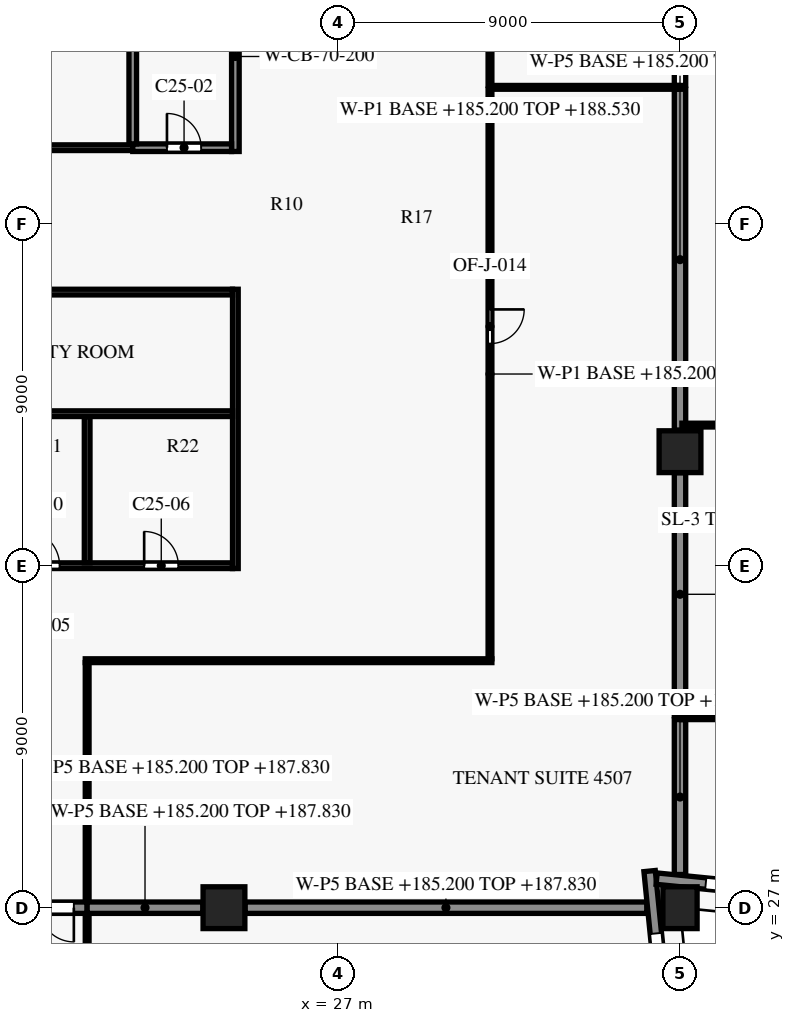
"""IFC4 building model, lengths in metres.
Left out: names, types, materials, properties, quantities, classifications, styles, units other than length and angle.
Written with IfcOpenShell. Run it as: python <this file> out.ifc"""

import sys

from ifc_helpers import new_model, si_unit, direction, frame, frame_2d, origin, origin_2d, place, context, subcontext, project, spatial, rectangle, extrude, element, fill, save


model = new_model("IFC4")
c1 = context("Model", 3, precision=1e-05, world=origin(), true_north=direction((0.0, 1.0)))
c2 = subcontext(c1, "Body", "Model", "MODEL_VIEW")
j1 = project(units=[si_unit("LENGTHUNIT", "METRE"), si_unit("PLANEANGLEUNIT", "RADIAN")], contexts=[c1])
p1 = place(None, origin())
s1 = spatial("IfcSite", under=j1, at=p1, CompositionType="ELEMENT")
p2 = place(p1, origin())
s2 = spatial("IfcBuilding", under=s1, at=p2, CompositionType="ELEMENT")
p3 = place(p2, frame((0.0, 0.0, 185.2)))
s3 = spatial("IfcBuildingStorey", under=s2, at=p3, CompositionType="ELEMENT", Elevation=185.2)
p4 = place(p3, frame((36.0, 27.0, 0.0), z_axis=(0.0, 0.0, 1.0), x_axis=(-0.0995038382, 0.995037178292, 0.0)))
e1 = element("IfcColumn", 1, at=p4, inside=s3, PredefinedType="COLUMN", context=c2, shape_type="SweptSolid", body=[
    extrude(rectangle(XDim=0.9, YDim=1.1, at=origin_2d()), origin(), (0.0, 0.0, 1.0), 3.8),
])
for number, where, z_axis, x_axis in (
    (2, (24.0, 27.0, 0.0), (0.0, 0.0, 1.0), (1.0, 0.0, 0.0)),
    (3, (36.0, 39.0, 0.0), (0.0, 0.0, 1.0), (1.0, 0.0, 0.0)),
):
    element("IfcColumn", number, at=place(p3, frame(where, z_axis=z_axis, x_axis=x_axis)), inside=s3, PredefinedType="COLUMN", context=c2, shape_type="SweptSolid", body=[
        extrude(rectangle(XDim=1.1, YDim=1.1, at=origin_2d()), origin(), (0.0, 0.0, 1.0), 3.8),
    ])
p5 = place(p3, frame((35.2, 27.964, 0.0), z_axis=(0.0, 0.0, 1.0), x_axis=(0.099501297882, -0.995037432321, 0.0)))
e4 = element("IfcWall", 4, at=p5, inside=s3, PredefinedType="SOLIDWALL", context=c2, shape_type="SweptSolid", body=[
    extrude(rectangle(XDim=9.984, YDim=0.3, at=frame_2d((4.992, 0.0))), origin(), (0.0, 0.0, 1.0), 3.15),
])
p6 = place(p5, frame((1.65, 0.0, 0.15)))
e5 = element("IfcOpeningElement", 5, at=p6, cuts=e4, PredefinedType="OPENING", context=c2, shape_type="SweptSolid", body=[
    extrude(rectangle(XDim=3.3, YDim=2.4, at=frame_2d((1.65, 1.2))), frame((0.0, 0.16, 0.0), z_axis=(0.0, -1.0, 0.0), x_axis=(1.0, 0.0, 0.0)), (0.0, 0.0, 1.0), 0.32),
])
p7 = place(p5, frame((6.923, 0.0, 0.75)))
e6 = element("IfcOpeningElement", 6, at=p7, cuts=e4, PredefinedType="OPENING", context=c2, shape_type="SweptSolid", body=[
    extrude(rectangle(XDim=1.8, YDim=1.8, at=frame_2d((0.9, 0.9))), frame((0.0, 0.16, 0.0), z_axis=(0.0, -1.0, 0.0), x_axis=(1.0, 0.0, 0.0)), (0.0, 0.0, 1.0), 0.32),
])
p8 = place(p3, frame((45.015, 26.802, 0.0), z_axis=(0.0, 0.0, 1.0), x_axis=(-0.995037689759, 0.099498723402, 0.0)))
e7 = element("IfcWall", 7, at=p8, inside=s3, PredefinedType="SOLIDWALL", context=c2, shape_type="SweptSolid", body=[
    extrude(rectangle(XDim=9.677, YDim=0.3, at=frame_2d((4.839, 0.0))), origin(), (0.0, 0.0, 1.0), 3.15),
])
p9 = place(p8, frame((1.306, 0.0, 0.75)))
e8 = element("IfcOpeningElement", 8, at=p9, cuts=e7, PredefinedType="OPENING", context=c2, shape_type="SweptSolid", body=[
    extrude(rectangle(XDim=1.8, YDim=1.8, at=frame_2d((0.9, 0.9))), frame((0.0, 0.16, 0.0), z_axis=(0.0, -1.0, 0.0), x_axis=(1.0, 0.0, 0.0)), (0.0, 0.0, 1.0), 0.32),
])
p10 = place(p8, frame((5.079, 0.0, 0.15)))
e9 = element("IfcOpeningElement", 9, at=p10, cuts=e7, PredefinedType="OPENING", context=c2, shape_type="SweptSolid", body=[
    extrude(rectangle(XDim=3.3, YDim=2.4, at=frame_2d((1.65, 1.2))), frame((0.0, 0.16, 0.0), z_axis=(0.0, -1.0, 0.0), x_axis=(1.0, 0.0, 0.0)), (0.0, 0.0, 1.0), 0.32),
])
p11 = place(p3, frame((12.4, 36.0, 0.0), z_axis=(0.0, 0.0, 1.0), x_axis=(1.0, 0.0, 0.0)))
e10 = element("IfcWall", 10, at=p11, inside=s3, PredefinedType="SHEAR", context=c2, shape_type="SweptSolid", body=[
    extrude(rectangle(XDim=11.825, YDim=0.15, at=frame_2d((5.913, 0.0))), origin(), (0.0, 0.0, 1.0), 3.5),
])
p12 = place(p11, frame((0.95, 0.0, 0.0)))
e11 = element("IfcOpeningElement", 11, at=p12, cuts=e10, PredefinedType="OPENING", context=c2, shape_type="SweptSolid", body=[
    extrude(rectangle(XDim=0.9, YDim=2.1, at=frame_2d((0.45, 1.05))), frame((0.0, 0.085, 0.0), z_axis=(0.0, -1.0, 0.0), x_axis=(1.0, 0.0, 0.0)), (0.0, 0.0, 1.0), 0.17),
])
p13 = place(p11, frame((3.75, 0.0, 0.0)))
e12 = element("IfcOpeningElement", 12, at=p13, cuts=e10, PredefinedType="OPENING", context=c2, shape_type="SweptSolid", body=[
    extrude(rectangle(XDim=0.9, YDim=2.1, at=frame_2d((0.45, 1.05))), frame((0.0, 0.085, 0.0), z_axis=(0.0, -1.0, 0.0), x_axis=(1.0, 0.0, 0.0)), (0.0, 0.0, 1.0), 0.17),
])
p14 = place(p11, frame((6.325, 0.0, 0.0)))
e13 = element("IfcOpeningElement", 13, at=p14, cuts=e10, PredefinedType="OPENING", context=c2, shape_type="SweptSolid", body=[
    extrude(rectangle(XDim=0.95, YDim=2.1, at=frame_2d((0.475, 1.05))), frame((0.0, 0.085, 0.0), z_axis=(0.0, -1.0, 0.0), x_axis=(1.0, 0.0, 0.0)), (0.0, 0.0, 1.0), 0.17),
])
p15 = place(p11, frame((9.5, 0.0, 0.0)))
e14 = element("IfcOpeningElement", 14, at=p15, cuts=e10, PredefinedType="OPENING", context=c2, shape_type="SweptSolid", body=[
    extrude(rectangle(XDim=0.9, YDim=2.1, at=frame_2d((0.45, 1.05))), frame((0.0, 0.085, 0.0), z_axis=(0.0, -1.0, 0.0), x_axis=(1.0, 0.0, 0.0)), (0.0, 0.0, 1.0), 0.17),
])
p16 = place(p3, frame((8.1, 40.0, 0.0), z_axis=(0.0, 0.0, 1.0), x_axis=(1.0, 0.0, 0.0)))
e15 = element("IfcWall", 15, at=p16, inside=s3, PredefinedType="PARTITIONING", context=c2, shape_type="SweptSolid", body=[
    extrude(rectangle(XDim=16.125, YDim=0.15, at=frame_2d((8.062, 0.0))), origin(), (0.0, 0.0, 1.0), 3.5),
])
p17 = place(p3, frame((8.1, 43.2, 0.0), z_axis=(0.0, 0.0, 1.0), x_axis=(1.0, 0.0, 0.0)))
e16 = element("IfcWall", 16, at=p17, inside=s3, PredefinedType="PARTITIONING", context=c2, shape_type="SweptSolid", body=[
    extrude(rectangle(XDim=16.125, YDim=0.15, at=frame_2d((8.062, 0.0))), origin(), (0.0, 0.0, 1.0), 3.5),
])
p18 = place(p17, frame((1.925, 0.0, 0.0)))
e17 = element("IfcOpeningElement", 17, at=p18, cuts=e16, PredefinedType="OPENING", context=c2, shape_type="SweptSolid", body=[
    extrude(rectangle(XDim=0.9, YDim=2.1, at=frame_2d((0.45, 1.05))), frame((0.0, 0.085, 0.0), z_axis=(0.0, -1.0, 0.0), x_axis=(1.0, 0.0, 0.0)), (0.0, 0.0, 1.0), 0.17),
])
p19 = place(p17, frame((10.025, 0.0, 0.0)))
e18 = element("IfcOpeningElement", 18, at=p19, cuts=e16, PredefinedType="OPENING", context=c2, shape_type="SweptSolid", body=[
    extrude(rectangle(XDim=0.9, YDim=2.1, at=frame_2d((0.45, 1.05))), frame((0.0, 0.085, 0.0), z_axis=(0.0, -1.0, 0.0), x_axis=(1.0, 0.0, 0.0)), (0.0, 0.0, 1.0), 0.17),
])
p20 = place(p3, frame((8.1, 47.0, 0.0), z_axis=(0.0, 0.0, 1.0), x_axis=(1.0, 0.0, 0.0)))
e19 = element("IfcWall", 19, at=p20, inside=s3, PredefinedType="PARTITIONING", context=c2, shape_type="SweptSolid", body=[
    extrude(rectangle(XDim=13.5, YDim=0.15, at=frame_2d((6.75, 0.0))), origin(), (0.0, 0.0, 1.0), 3.5),
])
p21 = place(p20, frame((1.525, 0.0, 0.0)))
e20 = element("IfcOpeningElement", 20, at=p21, cuts=e19, PredefinedType="OPENING", context=c2, shape_type="SweptSolid", body=[
    extrude(rectangle(XDim=0.9, YDim=2.1, at=frame_2d((0.45, 1.05))), frame((0.0, 0.085, 0.0), z_axis=(0.0, -1.0, 0.0), x_axis=(1.0, 0.0, 0.0)), (0.0, 0.0, 1.0), 0.17),
])
p22 = place(p20, frame((8.275, 0.0, 0.0)))
e21 = element("IfcOpeningElement", 21, at=p22, cuts=e19, PredefinedType="OPENING", context=c2, shape_type="SweptSolid", body=[
    extrude(rectangle(XDim=0.9, YDim=2.1, at=frame_2d((0.45, 1.05))), frame((0.0, 0.085, 0.0), z_axis=(0.0, -1.0, 0.0), x_axis=(1.0, 0.0, 0.0)), (0.0, 0.0, 1.0), 0.17),
])
p23 = place(p3, frame((21.6, 47.0, 0.0), z_axis=(0.0, 0.0, 1.0), x_axis=(1.0, 0.0, 0.0)))
e22 = element("IfcWall", 22, at=p23, inside=s3, PredefinedType="PARTITIONING", context=c2, shape_type="SweptSolid", body=[
    extrude(rectangle(XDim=2.6, YDim=0.2, at=frame_2d((1.3, 0.0))), origin(), (0.0, 0.0, 1.0), 3.5),
])
p24 = place(p23, frame((0.9, 0.0, 0.0)))
e23 = element("IfcOpeningElement", 23, at=p24, cuts=e22, PredefinedType="OPENING", context=c2, shape_type="SweptSolid", body=[
    extrude(rectangle(XDim=0.9, YDim=2.1, at=frame_2d((0.45, 1.05))), frame((0.0, 0.11, 0.0), z_axis=(0.0, -1.0, 0.0), x_axis=(1.0, 0.0, 0.0)), (0.0, 0.0, 1.0), 0.22),
])
p25 = place(p3, frame((20.4, 36.075, 0.0), z_axis=(0.0, 0.0, 1.0), x_axis=(0.0, 1.0, 0.0)))
e24 = element("IfcWall", 24, at=p25, inside=s3, PredefinedType="PARTITIONING", context=c2, shape_type="SweptSolid", body=[
    extrude(rectangle(XDim=3.85, YDim=0.15, at=frame_2d((1.925, 0.0))), origin(), (0.0, 0.0, 1.0), 3.5),
])
p26 = place(p3, frame((21.6, 47.1, 0.0), z_axis=(0.0, 0.0, 1.0), x_axis=(0.0, 1.0, 0.0)))
e25 = element("IfcWall", 25, at=p26, inside=s3, PredefinedType="PARTITIONING", context=c2, shape_type="SweptSolid", body=[
    extrude(rectangle(XDim=4.6, YDim=0.2, at=frame_2d((2.3, 0.0))), origin(), (0.0, 0.0, 1.0), 3.5),
])
p27 = place(p3, frame((24.3, 35.925, 0.0), z_axis=(0.0, 0.0, 1.0), x_axis=(0.0, 1.0, 0.0)))
e26 = element("IfcWall", 26, at=p27, inside=s3, PredefinedType="PARTITIONING", context=c2, shape_type="SweptSolid", body=[
    extrude(rectangle(XDim=7.35, YDim=0.15, at=frame_2d((3.675, 0.0))), origin(), (0.0, 0.0, 1.0), 3.5),
])
p28 = place(p3, frame((24.3, 46.9, 0.0), z_axis=(0.0, 0.0, 1.0), x_axis=(0.0, 1.0, 0.0)))
e27 = element("IfcWall", 27, at=p28, inside=s3, PredefinedType="SHEAR", context=c2, shape_type="SweptSolid", body=[
    extrude(rectangle(XDim=5.0, YDim=0.2, at=frame_2d((2.5, 0.0))), origin(), (0.0, 0.0, 1.0), 3.5),
])
p29 = place(p3, frame((20.4, 26.83, 0.0), z_axis=(0.0, 0.0, 1.0), x_axis=(0.0, -1.0, 0.0)))
e28 = element("IfcWall", 28, at=p29, inside=s3, PredefinedType="PARTITIONING", context=c2, shape_type="SweptSolid", body=[
    extrude(rectangle(XDim=14.48, YDim=0.1, at=frame_2d((7.24, 0.0))), origin(), (0.0, 0.0, 1.0), 2.63),
])
p30 = place(p29, frame((6.73, 0.0, 0.0)))
e29 = element("IfcOpeningElement", 29, at=p30, cuts=e28, PredefinedType="OPENING", context=c2, shape_type="SweptSolid", body=[
    extrude(rectangle(XDim=0.9, YDim=2.1, at=frame_2d((0.45, 1.05))), frame((0.0, 0.06, 0.0), z_axis=(0.0, -1.0, 0.0), x_axis=(1.0, 0.0, 0.0)), (0.0, 0.0, 1.0), 0.12),
])
p31 = place(p3, frame((20.4, 27.0, 0.0), z_axis=(0.0, 0.0, 1.0), x_axis=(-1.0, 0.0, 0.0)))
e30 = element("IfcWall", 30, at=p31, inside=s3, PredefinedType="PARTITIONING", context=c2, shape_type="SweptSolid", body=[
    extrude(rectangle(XDim=2.5, YDim=0.3, at=frame_2d((1.25, 0.0))), origin(), (0.0, 0.0, 1.0), 2.63),
])
p32 = place(p31, frame((0.35, 0.0, 0.0)))
e31 = element("IfcOpeningElement", 31, at=p32, cuts=e30, PredefinedType="OPENING", context=c2, shape_type="SweptSolid", body=[
    extrude(rectangle(XDim=1.8, YDim=2.1, at=frame_2d((0.9, 1.05))), frame((0.0, 0.16, 0.0), z_axis=(0.0, -1.0, 0.0), x_axis=(1.0, 0.0, 0.0)), (0.0, 0.0, 1.0), 0.32),
])
p33 = place(p3, frame((20.4, 27.0, 0.0), z_axis=(0.0, 0.0, 1.0), x_axis=(1.0, 0.0, 0.0)))
e32 = element("IfcWall", 32, at=p33, inside=s3, PredefinedType="PARTITIONING", context=c2, shape_type="SweptSolid", body=[
    extrude(rectangle(XDim=3.045, YDim=0.3, at=frame_2d((1.522, 0.0))), origin(), (0.0, 0.0, 1.0), 2.63),
])
p34 = place(p3, frame((24.555, 27.0, 0.0), z_axis=(0.0, 0.0, 1.0), x_axis=(1.0, 0.0, 0.0)))
e33 = element("IfcWall", 33, at=p34, inside=s3, PredefinedType="PARTITIONING", context=c2, shape_type="SweptSolid", body=[
    extrude(rectangle(XDim=10.571, YDim=0.3, at=frame_2d((5.285, 0.0))), origin(), (0.0, 0.0, 1.0), 2.63),
])
p35 = place(p3, frame((36.0, 27.874, 0.0), z_axis=(0.0, 0.0, 1.0), x_axis=(0.0, 1.0, 0.0)))
e34 = element("IfcWall", 34, at=p35, inside=s3, PredefinedType="PARTITIONING", context=c2, shape_type="SweptSolid", body=[
    extrude(rectangle(XDim=4.076, YDim=0.3, at=frame_2d((2.038, 0.0))), origin(), (0.0, 0.0, 1.0), 2.63),
])
p36 = place(p3, frame((44.95, 32.0, 0.0), z_axis=(0.0, 0.0, 1.0), x_axis=(-1.0, 0.0, 0.0)))
e35 = element("IfcWall", 35, at=p36, inside=s3, PredefinedType="PARTITIONING", context=c2, shape_type="SweptSolid", body=[
    extrude(rectangle(XDim=8.9, YDim=0.1, at=frame_2d((4.45, 0.0))), origin(), (0.0, 0.0, 1.0), 2.63),
])
p37 = place(p36, frame((4.0, 0.0, 0.0)))
e36 = element("IfcOpeningElement", 36, at=p37, cuts=e35, PredefinedType="OPENING", context=c2, shape_type="SweptSolid", body=[
    extrude(rectangle(XDim=0.9, YDim=2.1, at=frame_2d((0.45, 1.05))), frame((0.0, 0.06, 0.0), z_axis=(0.0, -1.0, 0.0), x_axis=(1.0, 0.0, 0.0)), (0.0, 0.0, 1.0), 0.12),
])
p38 = place(p3, frame((36.0, 32.05, 0.0), z_axis=(0.0, 0.0, 1.0), x_axis=(0.0, 1.0, 0.0)))
e37 = element("IfcWall", 37, at=p38, inside=s3, PredefinedType="PARTITIONING", context=c2, shape_type="SweptSolid", body=[
    extrude(rectangle(XDim=6.395, YDim=0.3, at=frame_2d((3.198, 0.0))), origin(), (0.0, 0.0, 1.0), 2.63),
])
p39 = place(p3, frame((20.4, 33.45, 0.0), z_axis=(0.0, 0.0, 1.0), x_axis=(0.0, -1.0, 0.0)))
e38 = element("IfcWall", 38, at=p39, inside=s3, PredefinedType="PARTITIONING", context=c2, shape_type="SweptSolid", body=[
    extrude(rectangle(XDim=6.28, YDim=0.1, at=frame_2d((3.14, 0.0))), origin(), (0.0, 0.0, 1.0), 2.63),
])
p40 = place(p3, frame((31.05, 33.5, 0.0), z_axis=(0.0, 0.0, 1.0), x_axis=(-1.0, 0.0, 0.0)))
e39 = element("IfcWall", 39, at=p40, inside=s3, PredefinedType="PARTITIONING", context=c2, shape_type="SweptSolid", body=[
    extrude(rectangle(XDim=10.7, YDim=0.1, at=frame_2d((5.35, 0.0))), origin(), (0.0, 0.0, 1.0), 2.63),
])
p41 = place(p3, frame((45.0, 39.7, 0.0), z_axis=(0.0, 0.0, 1.0), x_axis=(-1.0, 0.0, 0.0)))
e40 = element("IfcWall", 40, at=p41, inside=s3, PredefinedType="PARTITIONING", context=c2, shape_type="SweptSolid", body=[
    extrude(rectangle(XDim=8.95, YDim=0.1, at=frame_2d((4.475, 0.0))), origin(), (0.0, 0.0, 1.0), 2.63),
])
p42 = place(p41, frame((4.05, 0.0, 0.0)))
e41 = element("IfcOpeningElement", 41, at=p42, cuts=e40, PredefinedType="OPENING", context=c2, shape_type="SweptSolid", body=[
    extrude(rectangle(XDim=0.9, YDim=2.1, at=frame_2d((0.45, 1.05))), frame((0.0, 0.06, 0.0), z_axis=(0.0, -1.0, 0.0), x_axis=(1.0, 0.0, 0.0)), (0.0, 0.0, 1.0), 0.12),
])
p43 = place(p3, frame((36.0, 39.57, 0.0), z_axis=(0.0, 0.0, 1.0), x_axis=(0.0, 1.0, 0.0)))
e42 = element("IfcWall", 42, at=p43, inside=s3, PredefinedType="PARTITIONING", context=c2, shape_type="SweptSolid", body=[
    extrude(rectangle(XDim=8.968, YDim=0.3, at=frame_2d((4.484, 0.0))), origin(), (0.0, 0.0, 1.0), 2.63),
])
p44 = place(p3, frame((31.0, 48.538, 0.0), z_axis=(0.0, 0.0, 1.0), x_axis=(0.0, -1.0, 0.0)))
e43 = element("IfcWall", 43, at=p44, inside=s3, PredefinedType="PARTITIONING", context=c2, shape_type="SweptSolid", body=[
    extrude(rectangle(XDim=14.988, YDim=0.1, at=frame_2d((7.494, 0.0))), origin(), (0.0, 0.0, 1.0), 3.33),
])
p45 = place(p44, frame((5.794, 0.0, 0.0)))
e44 = element("IfcOpeningElement", 44, at=p45, cuts=e43, PredefinedType="OPENING", context=c2, shape_type="SweptSolid", body=[
    extrude(rectangle(XDim=0.9, YDim=2.1, at=frame_2d((0.45, 1.05))), frame((0.0, 0.06, 0.0), z_axis=(0.0, -1.0, 0.0), x_axis=(1.0, 0.0, 0.0)), (0.0, 0.0, 1.0), 0.12),
])
p46 = place(p3, frame((31.05, 48.588, 0.0), z_axis=(0.0, 0.0, 1.0), x_axis=(1.0, 0.0, 0.0)))
e45 = element("IfcWall", 45, at=p46, inside=s3, PredefinedType="PARTITIONING", context=c2, shape_type="SweptSolid", body=[
    extrude(rectangle(XDim=4.9, YDim=0.1, at=frame_2d((2.45, 0.0))), origin(), (0.0, 0.0, 1.0), 2.63),
])
p47 = place(p3, frame((36.0, 48.638, 0.0), z_axis=(0.0, 0.0, 1.0), x_axis=(0.0, 1.0, 0.0)))
e46 = element("IfcWall", 46, at=p47, inside=s3, PredefinedType="PARTITIONING", context=c2, shape_type="SweptSolid", body=[
    extrude(rectangle(XDim=1.807, YDim=0.3, at=frame_2d((0.904, 0.0))), origin(), (0.0, 0.0, 1.0), 2.63),
])
p48 = place(p3, frame((31.0, 54.95, 0.0), z_axis=(0.0, 0.0, 1.0), x_axis=(0.0, -1.0, 0.0)))
e47 = element("IfcWall", 47, at=p48, inside=s3, PredefinedType="PARTITIONING", context=c2, shape_type="SweptSolid", body=[
    extrude(rectangle(XDim=6.312, YDim=0.1, at=frame_2d((3.156, 0.0))), origin(), (0.0, 0.0, 1.0), 3.33),
])
p49 = place(p48, frame((2.706, 0.0, 0.0)))
e48 = element("IfcOpeningElement", 48, at=p49, cuts=e47, PredefinedType="OPENING", context=c2, shape_type="SweptSolid", body=[
    extrude(rectangle(XDim=0.9, YDim=2.1, at=frame_2d((0.45, 1.05))), frame((0.0, 0.06, 0.0), z_axis=(0.0, -1.0, 0.0), x_axis=(1.0, 0.0, 0.0)), (0.0, 0.0, 1.0), 0.12),
])
p50 = place(p6, origin())
e49 = element("IfcWindow", 49, at=p50, inside=s3, PartitioningType="SINGLE_PANEL", PredefinedType="WINDOW", context=c2, shape_type="SweptSolid", body=[
    extrude(rectangle(XDim=3.3, YDim=2.4, at=frame_2d((1.65, 1.2))), frame((0.0, 0.03, 0.0), z_axis=(0.0, -1.0, 0.0), x_axis=(1.0, 0.0, 0.0)), (0.0, 0.0, 1.0), 0.06),
])
fill(e5, e49)
p51 = place(p10, origin())
e50 = element("IfcWindow", 50, at=p51, inside=s3, PartitioningType="SINGLE_PANEL", PredefinedType="WINDOW", context=c2, shape_type="SweptSolid", body=[
    extrude(rectangle(XDim=3.3, YDim=2.4, at=frame_2d((1.65, 1.2))), frame((0.0, 0.03, 0.0), z_axis=(0.0, -1.0, 0.0), x_axis=(1.0, 0.0, 0.0)), (0.0, 0.0, 1.0), 0.06),
])
fill(e9, e50)
p52 = place(p24, origin())
e51 = element("IfcDoor", 51, at=p52, inside=s3, OperationType="SINGLE_SWING_LEFT", PredefinedType="DOOR", context=c2, shape_type="SweptSolid", body=[
    extrude(rectangle(XDim=0.9, YDim=2.1, at=frame_2d((0.45, 1.05))), frame((0.0, 0.025, 0.0), z_axis=(0.0, -1.0, 0.0), x_axis=(1.0, 0.0, 0.0)), (0.0, 0.0, 1.0), 0.05),
])
fill(e23, e51)
p53 = place(p14, origin())
e52 = element("IfcDoor", 52, at=p53, inside=s3, OperationType="SINGLE_SWING_RIGHT", PredefinedType="DOOR", context=c2, shape_type="SweptSolid", body=[
    extrude(rectangle(XDim=0.95, YDim=2.1, at=frame_2d((0.475, 1.05))), frame((0.0, 0.025, 0.0), z_axis=(0.0, -1.0, 0.0), x_axis=(1.0, 0.0, 0.0)), (0.0, 0.0, 1.0), 0.05),
])
fill(e13, e52)
p54 = place(p15, origin())
e53 = element("IfcDoor", 53, at=p54, inside=s3, OperationType="SINGLE_SWING_LEFT", PredefinedType="DOOR", context=c2, shape_type="SweptSolid", body=[
    extrude(rectangle(XDim=0.9, YDim=2.1, at=frame_2d((0.45, 1.05))), frame((0.0, 0.025, 0.0), z_axis=(0.0, -1.0, 0.0), x_axis=(1.0, 0.0, 0.0)), (0.0, 0.0, 1.0), 0.05),
])
fill(e14, e53)
p55 = place(p45, origin())
e54 = element("IfcDoor", 54, at=p55, inside=s3, OperationType="SINGLE_SWING_RIGHT", PredefinedType="DOOR", context=c2, shape_type="SweptSolid", body=[
    extrude(rectangle(XDim=0.9, YDim=2.1, at=frame_2d((0.45, 1.05))), frame((0.0, 0.025, 0.0), z_axis=(0.0, -1.0, 0.0), x_axis=(1.0, 0.0, 0.0)), (0.0, 0.0, 1.0), 0.05),
])
fill(e44, e54)
p56 = place(p32, origin())
e55 = element("IfcDoor", 55, at=p56, inside=s3, OperationType="DOUBLE_DOOR_SINGLE_SWING", PredefinedType="DOOR", context=c2, shape_type="SweptSolid", body=[
    extrude(rectangle(XDim=1.8, YDim=2.1, at=frame_2d((0.9, 1.05))), frame((0.0, 0.025, 0.0), z_axis=(0.0, -1.0, 0.0), x_axis=(1.0, 0.0, 0.0)), (0.0, 0.0, 1.0), 0.05),
])
fill(e31, e55)
save(model, sys.argv[1])
